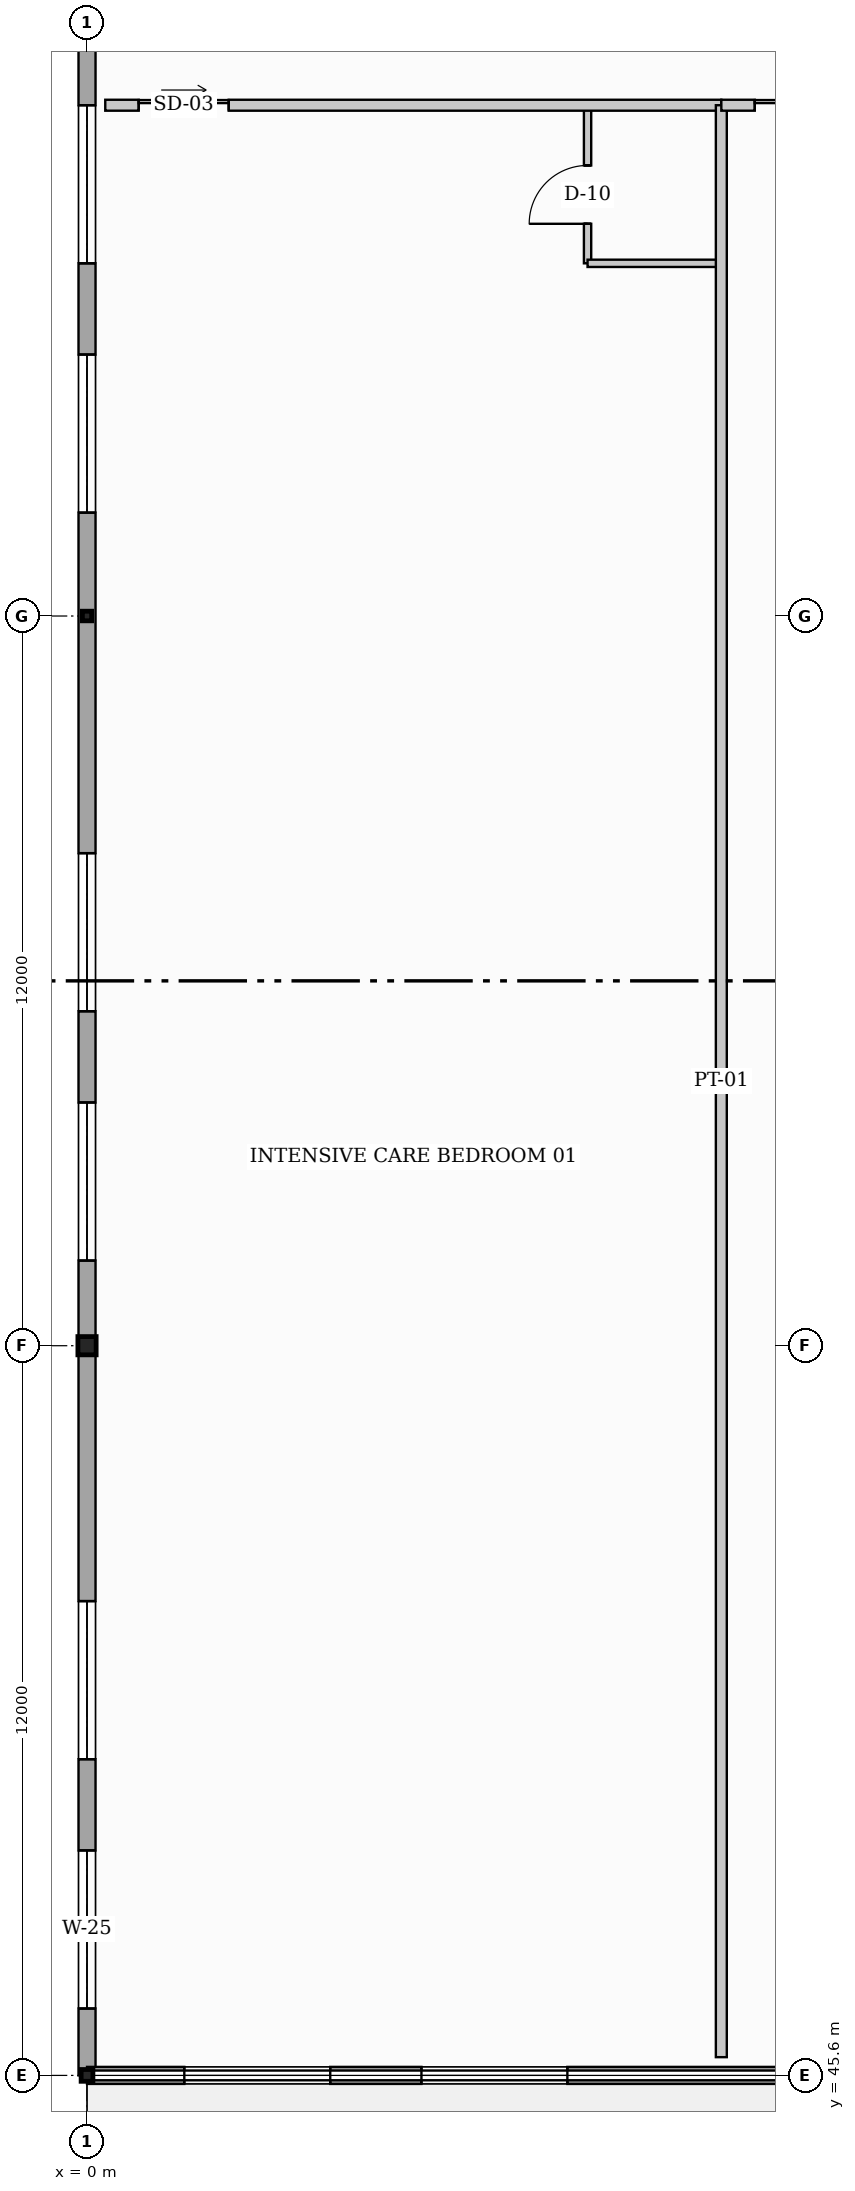
"""IFC4 building model, lengths in metres.
Left out: names, types, materials, properties, quantities, classifications, styles, units other than length and angle.
Written with IfcOpenShell. Run it as: python <this file> out.ifc"""

import sys

from ifc_helpers import new_model, si_unit, direction, frame, frame_2d, origin, origin_2d, place, context, subcontext, project, spatial, rectangle, hollow_rectangle, hollow_circle, i_section, extrude, element, fill, save


model = new_model("IFC4")
c1 = context("Model", 3, precision=1e-05, world=origin(), true_north=direction((0.0, 1.0)))
c2 = subcontext(c1, "Body", "Model", "MODEL_VIEW")
j1 = project(units=[si_unit("LENGTHUNIT", "METRE"), si_unit("PLANEANGLEUNIT", "RADIAN")], contexts=[c1])
p1 = place(None, origin())
s1 = spatial("IfcSite", under=j1, at=p1, CompositionType="ELEMENT")
p2 = place(p1, origin())
s2 = spatial("IfcBuilding", under=s1, at=p2, CompositionType="ELEMENT")
p3 = place(p2, frame((0.0, 0.0, 4.8)))
s3 = spatial("IfcBuildingStorey", under=s2, at=p3, CompositionType="ELEMENT", Elevation=4.8)
p4 = place(p3, frame((0.0, 45.6, 0.0), z_axis=(0.0, 0.0, 1.0), x_axis=(1.0, 0.0, 0.0)))
e1 = element("IfcColumn", 1, at=p4, inside=s3, PredefinedType="COLUMN", context=c2, shape_type="SweptSolid", body=[
    extrude(hollow_circle(Radius=0.097, WallThickness=0.008, at=origin_2d()), origin(), (0.0, 0.0, 1.0), 4.8),
])
p5 = place(p3, frame((0.0, 57.6, 0.0), z_axis=(0.0, 0.0, 1.0), x_axis=(1.0, 0.0, 0.0)))
e2 = element("IfcColumn", 2, at=p5, inside=s3, PredefinedType="COLUMN", context=c2, shape_type="SweptSolid", body=[
    extrude(hollow_rectangle(XDim=0.3, YDim=0.3, WallThickness=0.012, at=origin_2d()), origin(), (0.0, 0.0, 1.0), 4.8),
])
p6 = place(p3, frame((0.0, 69.6, 0.0), z_axis=(0.0, 0.0, 1.0), x_axis=(1.0, 0.0, 0.0)))
e3 = element("IfcColumn", 3, at=p6, inside=s3, PredefinedType="COLUMN", context=c2, shape_type="SweptSolid", body=[
    extrude(i_section(OverallWidth=0.153, OverallDepth=0.158, WebThickness=0.007, FlangeThickness=0.01, at=origin_2d()), origin(), (0.0, 0.0, 1.0), 4.8),
])
p7 = place(p3, frame((0.0, 45.6, 0.0), z_axis=(0.0, 0.0, 1.0), x_axis=(0.0, 1.0, 0.0)))
e4 = element("IfcWall", 4, at=p7, inside=s3, PredefinedType="STANDARD", context=c2, shape_type="SweptSolid", body=[
    extrude(rectangle(XDim=80.4, YDim=0.28, at=frame_2d((40.2, 0.0))), origin(), (0.0, 0.0, 1.0), 3.465),
])
p8 = place(p7, frame((1.1, 0.0, 0.95)))
e5 = element("IfcOpeningElement", 5, at=p8, cuts=e4, PredefinedType="OPENING", context=c2, shape_type="SweptSolid", body=[
    extrude(rectangle(XDim=2.6, YDim=1.6, at=frame_2d((1.3, 0.8))), frame((0.0, 0.15, 0.0), z_axis=(0.0, -1.0, 0.0), x_axis=(1.0, 0.0, 0.0)), (0.0, 0.0, 1.0), 0.3),
])
p9 = place(p7, frame((5.2, 0.0, 0.95)))
e6 = element("IfcOpeningElement", 6, at=p9, cuts=e4, PredefinedType="OPENING", context=c2, shape_type="SweptSolid", body=[
    extrude(rectangle(XDim=2.6, YDim=1.6, at=frame_2d((1.3, 0.8))), frame((0.0, 0.15, 0.0), z_axis=(0.0, -1.0, 0.0), x_axis=(1.0, 0.0, 0.0)), (0.0, 0.0, 1.0), 0.3),
])
p10 = place(p7, frame((13.4, 0.0, 0.95)))
e7 = element("IfcOpeningElement", 7, at=p10, cuts=e4, PredefinedType="OPENING", context=c2, shape_type="SweptSolid", body=[
    extrude(rectangle(XDim=2.6, YDim=1.6, at=frame_2d((1.3, 0.8))), frame((0.0, 0.15, 0.0), z_axis=(0.0, -1.0, 0.0), x_axis=(1.0, 0.0, 0.0)), (0.0, 0.0, 1.0), 0.3),
])
p11 = place(p7, frame((17.5, 0.0, 0.95)))
e8 = element("IfcOpeningElement", 8, at=p11, cuts=e4, PredefinedType="OPENING", context=c2, shape_type="SweptSolid", body=[
    extrude(rectangle(XDim=2.6, YDim=1.6, at=frame_2d((1.3, 0.8))), frame((0.0, 0.15, 0.0), z_axis=(0.0, -1.0, 0.0), x_axis=(1.0, 0.0, 0.0)), (0.0, 0.0, 1.0), 0.3),
])
p12 = place(p7, frame((25.7, 0.0, 0.95)))
e9 = element("IfcOpeningElement", 9, at=p12, cuts=e4, PredefinedType="OPENING", context=c2, shape_type="SweptSolid", body=[
    extrude(rectangle(XDim=2.6, YDim=1.6, at=frame_2d((1.3, 0.8))), frame((0.0, 0.15, 0.0), z_axis=(0.0, -1.0, 0.0), x_axis=(1.0, 0.0, 0.0)), (0.0, 0.0, 1.0), 0.3),
])
p13 = place(p7, frame((29.8, 0.0, 0.95)))
e10 = element("IfcOpeningElement", 10, at=p13, cuts=e4, PredefinedType="OPENING", context=c2, shape_type="SweptSolid", body=[
    extrude(rectangle(XDim=2.6, YDim=1.6, at=frame_2d((1.3, 0.8))), frame((0.0, 0.15, 0.0), z_axis=(0.0, -1.0, 0.0), x_axis=(1.0, 0.0, 0.0)), (0.0, 0.0, 1.0), 0.3),
])
p14 = place(p7, frame((38.0, 0.0, 0.95)))
e11 = element("IfcOpeningElement", 11, at=p14, cuts=e4, PredefinedType="OPENING", context=c2, shape_type="SweptSolid", body=[
    extrude(rectangle(XDim=2.6, YDim=1.6, at=frame_2d((1.3, 0.8))), frame((0.0, 0.15, 0.0), z_axis=(0.0, -1.0, 0.0), x_axis=(1.0, 0.0, 0.0)), (0.0, 0.0, 1.0), 0.3),
])
p15 = place(p7, frame((42.1, 0.0, 0.95)))
e12 = element("IfcOpeningElement", 12, at=p15, cuts=e4, PredefinedType="OPENING", context=c2, shape_type="SweptSolid", body=[
    extrude(rectangle(XDim=2.6, YDim=1.6, at=frame_2d((1.3, 0.8))), frame((0.0, 0.15, 0.0), z_axis=(0.0, -1.0, 0.0), x_axis=(1.0, 0.0, 0.0)), (0.0, 0.0, 1.0), 0.3),
])
p16 = place(p7, frame((50.3, 0.0, 0.95)))
e13 = element("IfcOpeningElement", 13, at=p16, cuts=e4, PredefinedType="OPENING", context=c2, shape_type="SweptSolid", body=[
    extrude(rectangle(XDim=2.6, YDim=1.6, at=frame_2d((1.3, 0.8))), frame((0.0, 0.15, 0.0), z_axis=(0.0, -1.0, 0.0), x_axis=(1.0, 0.0, 0.0)), (0.0, 0.0, 1.0), 0.3),
])
p17 = place(p7, frame((54.4, 0.0, 0.95)))
e14 = element("IfcOpeningElement", 14, at=p17, cuts=e4, PredefinedType="OPENING", context=c2, shape_type="SweptSolid", body=[
    extrude(rectangle(XDim=2.6, YDim=1.6, at=frame_2d((1.3, 0.8))), frame((0.0, 0.15, 0.0), z_axis=(0.0, -1.0, 0.0), x_axis=(1.0, 0.0, 0.0)), (0.0, 0.0, 1.0), 0.3),
])
p18 = place(p7, frame((62.6, 0.0, 0.95)))
e15 = element("IfcOpeningElement", 15, at=p18, cuts=e4, PredefinedType="OPENING", context=c2, shape_type="SweptSolid", body=[
    extrude(rectangle(XDim=2.6, YDim=1.6, at=frame_2d((1.3, 0.8))), frame((0.0, 0.15, 0.0), z_axis=(0.0, -1.0, 0.0), x_axis=(1.0, 0.0, 0.0)), (0.0, 0.0, 1.0), 0.3),
])
p19 = place(p7, frame((70.8, 0.0, 0.95)))
e16 = element("IfcOpeningElement", 16, at=p19, cuts=e4, PredefinedType="OPENING", context=c2, shape_type="SweptSolid", body=[
    extrude(rectangle(XDim=2.6, YDim=1.6, at=frame_2d((1.3, 0.8))), frame((0.0, 0.15, 0.0), z_axis=(0.0, -1.0, 0.0), x_axis=(1.0, 0.0, 0.0)), (0.0, 0.0, 1.0), 0.3),
])
p20 = place(p7, frame((74.9, 0.0, 0.95)))
e17 = element("IfcOpeningElement", 17, at=p20, cuts=e4, PredefinedType="OPENING", context=c2, shape_type="SweptSolid", body=[
    extrude(rectangle(XDim=2.6, YDim=1.6, at=frame_2d((1.3, 0.8))), frame((0.0, 0.15, 0.0), z_axis=(0.0, -1.0, 0.0), x_axis=(1.0, 0.0, 0.0)), (0.0, 0.0, 1.0), 0.3),
])
p21 = place(p3, frame((48.0, 45.6, 0.0), z_axis=(0.0, 0.0, 1.0), x_axis=(-1.0, 0.0, 0.0)))
e18 = element("IfcWall", 18, at=p21, inside=s3, PredefinedType="STANDARD", context=c2, shape_type="SweptSolid", body=[
    extrude(rectangle(XDim=48.0, YDim=0.28, at=frame_2d((24.0, 0.0))), origin(), (0.0, 0.0, 1.0), 3.465),
])
p22 = place(p21, frame((1.1, 0.0, 0.95)))
e19 = element("IfcOpeningElement", 19, at=p22, cuts=e18, PredefinedType="OPENING", context=c2, shape_type="SweptSolid", body=[
    extrude(rectangle(XDim=2.4, YDim=1.5, at=frame_2d((1.2, 0.75))), frame((0.0, 0.15, 0.0), z_axis=(0.0, -1.0, 0.0), x_axis=(1.0, 0.0, 0.0)), (0.0, 0.0, 1.0), 0.3),
])
p23 = place(p21, frame((5.0, 0.0, 0.95)))
e20 = element("IfcOpeningElement", 20, at=p23, cuts=e18, PredefinedType="OPENING", context=c2, shape_type="SweptSolid", body=[
    extrude(rectangle(XDim=2.4, YDim=1.5, at=frame_2d((1.2, 0.75))), frame((0.0, 0.15, 0.0), z_axis=(0.0, -1.0, 0.0), x_axis=(1.0, 0.0, 0.0)), (0.0, 0.0, 1.0), 0.3),
])
p24 = place(p21, frame((16.7, 0.0, 0.95)))
e21 = element("IfcOpeningElement", 21, at=p24, cuts=e18, PredefinedType="OPENING", context=c2, shape_type="SweptSolid", body=[
    extrude(rectangle(XDim=2.4, YDim=1.5, at=frame_2d((1.2, 0.75))), frame((0.0, 0.15, 0.0), z_axis=(0.0, -1.0, 0.0), x_axis=(1.0, 0.0, 0.0)), (0.0, 0.0, 1.0), 0.3),
])
p25 = place(p21, frame((20.6, 0.0, 0.95)))
e22 = element("IfcOpeningElement", 22, at=p25, cuts=e18, PredefinedType="OPENING", context=c2, shape_type="SweptSolid", body=[
    extrude(rectangle(XDim=2.4, YDim=1.5, at=frame_2d((1.2, 0.75))), frame((0.0, 0.15, 0.0), z_axis=(0.0, -1.0, 0.0), x_axis=(1.0, 0.0, 0.0)), (0.0, 0.0, 1.0), 0.3),
])
p26 = place(p21, frame((28.4, 0.0, 0.95)))
e23 = element("IfcOpeningElement", 23, at=p26, cuts=e18, PredefinedType="OPENING", context=c2, shape_type="SweptSolid", body=[
    extrude(rectangle(XDim=2.4, YDim=1.5, at=frame_2d((1.2, 0.75))), frame((0.0, 0.15, 0.0), z_axis=(0.0, -1.0, 0.0), x_axis=(1.0, 0.0, 0.0)), (0.0, 0.0, 1.0), 0.3),
])
p27 = place(p21, frame((32.3, 0.0, 0.95)))
e24 = element("IfcOpeningElement", 24, at=p27, cuts=e18, PredefinedType="OPENING", context=c2, shape_type="SweptSolid", body=[
    extrude(rectangle(XDim=2.4, YDim=1.5, at=frame_2d((1.2, 0.75))), frame((0.0, 0.15, 0.0), z_axis=(0.0, -1.0, 0.0), x_axis=(1.0, 0.0, 0.0)), (0.0, 0.0, 1.0), 0.3),
])
p28 = place(p21, frame((40.1, 0.0, 0.95)))
e25 = element("IfcOpeningElement", 25, at=p28, cuts=e18, PredefinedType="OPENING", context=c2, shape_type="SweptSolid", body=[
    extrude(rectangle(XDim=2.4, YDim=1.5, at=frame_2d((1.2, 0.75))), frame((0.0, 0.15, 0.0), z_axis=(0.0, -1.0, 0.0), x_axis=(1.0, 0.0, 0.0)), (0.0, 0.0, 1.0), 0.3),
])
p29 = place(p21, frame((44.0, 0.0, 0.95)))
e26 = element("IfcOpeningElement", 26, at=p29, cuts=e18, PredefinedType="OPENING", context=c2, shape_type="SweptSolid", body=[
    extrude(rectangle(XDim=2.4, YDim=1.5, at=frame_2d((1.2, 0.75))), frame((0.0, 0.15, 0.0), z_axis=(0.0, -1.0, 0.0), x_axis=(1.0, 0.0, 0.0)), (0.0, 0.0, 1.0), 0.3),
])
p30 = place(p3, frame((8.232, 75.4, 0.0), z_axis=(0.0, 0.0, 1.0), x_axis=(0.0, 1.0, 0.0)))
e27 = element("IfcWall", 27, at=p30, inside=s3, PredefinedType="PARTITIONING", context=c2, shape_type="SweptSolid", body=[
    extrude(rectangle(XDim=2.6, YDim=0.12, at=frame_2d((1.3, 0.0))), origin(), (0.0, 0.0, 1.0), 4.159),
])
p31 = place(p30, frame((0.65, 0.0, 0.0)))
e28 = element("IfcOpeningElement", 28, at=p31, cuts=e27, PredefinedType="OPENING", context=c2, shape_type="SweptSolid", body=[
    extrude(rectangle(XDim=0.96, YDim=2.06, at=frame_2d((0.48, 1.03))), frame((0.0, 0.07, 0.0), z_axis=(0.0, -1.0, 0.0), x_axis=(1.0, 0.0, 0.0)), (0.0, 0.0, 1.0), 0.14),
])
p32 = place(p3, frame((8.232, 75.4, 0.0), z_axis=(0.0, 0.0, 1.0), x_axis=(1.0, 0.0, 0.0)))
e29 = element("IfcWall", 29, at=p32, inside=s3, PredefinedType="PARTITIONING", context=c2, shape_type="SweptSolid", body=[
    extrude(rectangle(XDim=2.2, YDim=0.12, at=frame_2d((1.1, 0.0))), origin(), (0.0, 0.0, 1.0), 4.43),
])
p33 = place(p3, frame((0.3, 78.0, 0.0), z_axis=(0.0, 0.0, 1.0), x_axis=(1.0, 0.0, 0.0)))
e30 = element("IfcWall", 30, at=p33, inside=s3, PredefinedType="PARTITIONING", context=c2, shape_type="SweptSolid", body=[
    extrude(rectangle(XDim=10.132, YDim=0.18, at=frame_2d((5.066, 0.0))), origin(), (0.0, 0.0, 1.0), 4.065),
])
p34 = place(p33, frame((0.55, 0.0, 0.0)))
e31 = element("IfcOpeningElement", 31, at=p34, cuts=e30, PredefinedType="OPENING", context=c2, shape_type="SweptSolid", body=[
    extrude(rectangle(XDim=1.48, YDim=2.26, at=frame_2d((0.74, 1.13))), frame((0.0, 0.1, 0.0), z_axis=(0.0, -1.0, 0.0), x_axis=(1.0, 0.0, 0.0)), (0.0, 0.0, 1.0), 0.2),
])
p35 = place(p3, frame((10.432, 45.9, 0.0), z_axis=(0.0, 0.0, 1.0), x_axis=(0.0, 1.0, 0.0)))
e32 = element("IfcWall", 32, at=p35, inside=s3, PredefinedType="PARTITIONING", context=c2, shape_type="SweptSolid", body=[
    extrude(rectangle(XDim=32.1, YDim=0.18, at=frame_2d((16.05, 0.0))), origin(), (0.0, 0.0, 1.0), 3.823),
])
p36 = place(p3, frame((10.432, 78.0, 0.0), z_axis=(0.0, 0.0, 1.0), x_axis=(1.0, 0.0, 0.0)))
e33 = element("IfcWall", 33, at=p36, inside=s3, PredefinedType="PARTITIONING", context=c2, shape_type="SweptSolid", body=[
    extrude(rectangle(XDim=10.132, YDim=0.18, at=frame_2d((5.066, 0.0))), origin(), (0.0, 0.0, 1.0), 3.465),
])
p37 = place(p36, frame((0.55, 0.0, 0.0)))
e34 = element("IfcOpeningElement", 34, at=p37, cuts=e33, PredefinedType="OPENING", context=c2, shape_type="SweptSolid", body=[
    extrude(rectangle(XDim=1.48, YDim=2.26, at=frame_2d((0.74, 1.13))), frame((0.0, 0.1, 0.0), z_axis=(0.0, -1.0, 0.0), x_axis=(1.0, 0.0, 0.0)), (0.0, 0.0, 1.0), 0.2),
])
p38 = place(p8, origin())
e35 = element("IfcWindow", 35, at=p38, inside=s3, PartitioningType="TRIPLE_PANEL_VERTICAL", PredefinedType="WINDOW", context=c2, shape_type="SweptSolid", body=[
    extrude(rectangle(XDim=2.6, YDim=1.6, at=frame_2d((1.3, 0.8))), frame((0.0, 0.03, 0.0), z_axis=(0.0, -1.0, 0.0), x_axis=(1.0, 0.0, 0.0)), (0.0, 0.0, 1.0), 0.06),
])
fill(e5, e35)
p39 = place(p9, origin())
e36 = element("IfcWindow", 36, at=p39, inside=s3, PartitioningType="TRIPLE_PANEL_VERTICAL", PredefinedType="WINDOW", context=c2, shape_type="SweptSolid", body=[
    extrude(rectangle(XDim=2.6, YDim=1.6, at=frame_2d((1.3, 0.8))), frame((0.0, 0.03, 0.0), z_axis=(0.0, -1.0, 0.0), x_axis=(1.0, 0.0, 0.0)), (0.0, 0.0, 1.0), 0.06),
])
fill(e6, e36)
p40 = place(p10, origin())
e37 = element("IfcWindow", 37, at=p40, inside=s3, PartitioningType="TRIPLE_PANEL_VERTICAL", PredefinedType="WINDOW", context=c2, shape_type="SweptSolid", body=[
    extrude(rectangle(XDim=2.6, YDim=1.6, at=frame_2d((1.3, 0.8))), frame((0.0, 0.03, 0.0), z_axis=(0.0, -1.0, 0.0), x_axis=(1.0, 0.0, 0.0)), (0.0, 0.0, 1.0), 0.06),
])
fill(e7, e37)
p41 = place(p11, origin())
e38 = element("IfcWindow", 38, at=p41, inside=s3, PartitioningType="TRIPLE_PANEL_VERTICAL", PredefinedType="WINDOW", context=c2, shape_type="SweptSolid", body=[
    extrude(rectangle(XDim=2.6, YDim=1.6, at=frame_2d((1.3, 0.8))), frame((0.0, 0.03, 0.0), z_axis=(0.0, -1.0, 0.0), x_axis=(1.0, 0.0, 0.0)), (0.0, 0.0, 1.0), 0.06),
])
fill(e8, e38)
p42 = place(p12, origin())
e39 = element("IfcWindow", 39, at=p42, inside=s3, PartitioningType="TRIPLE_PANEL_VERTICAL", PredefinedType="WINDOW", context=c2, shape_type="SweptSolid", body=[
    extrude(rectangle(XDim=2.6, YDim=1.6, at=frame_2d((1.3, 0.8))), frame((0.0, 0.03, 0.0), z_axis=(0.0, -1.0, 0.0), x_axis=(1.0, 0.0, 0.0)), (0.0, 0.0, 1.0), 0.06),
])
fill(e9, e39)
p43 = place(p13, origin())
e40 = element("IfcWindow", 40, at=p43, inside=s3, PartitioningType="TRIPLE_PANEL_VERTICAL", PredefinedType="WINDOW", context=c2, shape_type="SweptSolid", body=[
    extrude(rectangle(XDim=2.6, YDim=1.6, at=frame_2d((1.3, 0.8))), frame((0.0, 0.03, 0.0), z_axis=(0.0, -1.0, 0.0), x_axis=(1.0, 0.0, 0.0)), (0.0, 0.0, 1.0), 0.06),
])
fill(e10, e40)
p44 = place(p28, origin())
e41 = element("IfcWindow", 41, at=p44, inside=s3, PartitioningType="TRIPLE_PANEL_VERTICAL", PredefinedType="WINDOW", context=c2, shape_type="SweptSolid", body=[
    extrude(rectangle(XDim=2.4, YDim=1.5, at=frame_2d((1.2, 0.75))), frame((0.0, 0.03, 0.0), z_axis=(0.0, -1.0, 0.0), x_axis=(1.0, 0.0, 0.0)), (0.0, 0.0, 1.0), 0.06),
])
fill(e25, e41)
p45 = place(p29, origin())
e42 = element("IfcWindow", 42, at=p45, inside=s3, PartitioningType="TRIPLE_PANEL_VERTICAL", PredefinedType="WINDOW", context=c2, shape_type="SweptSolid", body=[
    extrude(rectangle(XDim=2.4, YDim=1.5, at=frame_2d((1.2, 0.75))), frame((0.0, 0.03, 0.0), z_axis=(0.0, -1.0, 0.0), x_axis=(1.0, 0.0, 0.0)), (0.0, 0.0, 1.0), 0.06),
])
fill(e26, e42)
p46 = place(p31, origin())
e43 = element("IfcDoor", 43, at=p46, inside=s3, OperationType="SINGLE_SWING_LEFT", PredefinedType="DOOR", context=c2, shape_type="SweptSolid", body=[
    extrude(rectangle(XDim=0.96, YDim=2.06, at=frame_2d((0.48, 1.03))), frame((0.0, 0.025, 0.0), z_axis=(0.0, -1.0, 0.0), x_axis=(1.0, 0.0, 0.0)), (0.0, 0.0, 1.0), 0.05),
])
fill(e28, e43)
p47 = place(p34, origin())
e44 = element("IfcDoor", 44, at=p47, inside=s3, OperationType="SLIDING_TO_LEFT", PredefinedType="DOOR", context=c2, shape_type="SweptSolid", body=[
    extrude(rectangle(XDim=1.48, YDim=2.26, at=frame_2d((0.74, 1.13))), frame((0.0, 0.025, 0.0), z_axis=(0.0, -1.0, 0.0), x_axis=(1.0, 0.0, 0.0)), (0.0, 0.0, 1.0), 0.05),
])
fill(e31, e44)
p48 = place(p37, origin())
e45 = element("IfcDoor", 45, at=p48, inside=s3, OperationType="SLIDING_TO_LEFT", PredefinedType="DOOR", context=c2, shape_type="SweptSolid", body=[
    extrude(rectangle(XDim=1.48, YDim=2.26, at=frame_2d((0.74, 1.13))), frame((0.0, 0.025, 0.0), z_axis=(0.0, -1.0, 0.0), x_axis=(1.0, 0.0, 0.0)), (0.0, 0.0, 1.0), 0.05),
])
fill(e34, e45)
save(model, sys.argv[1])
